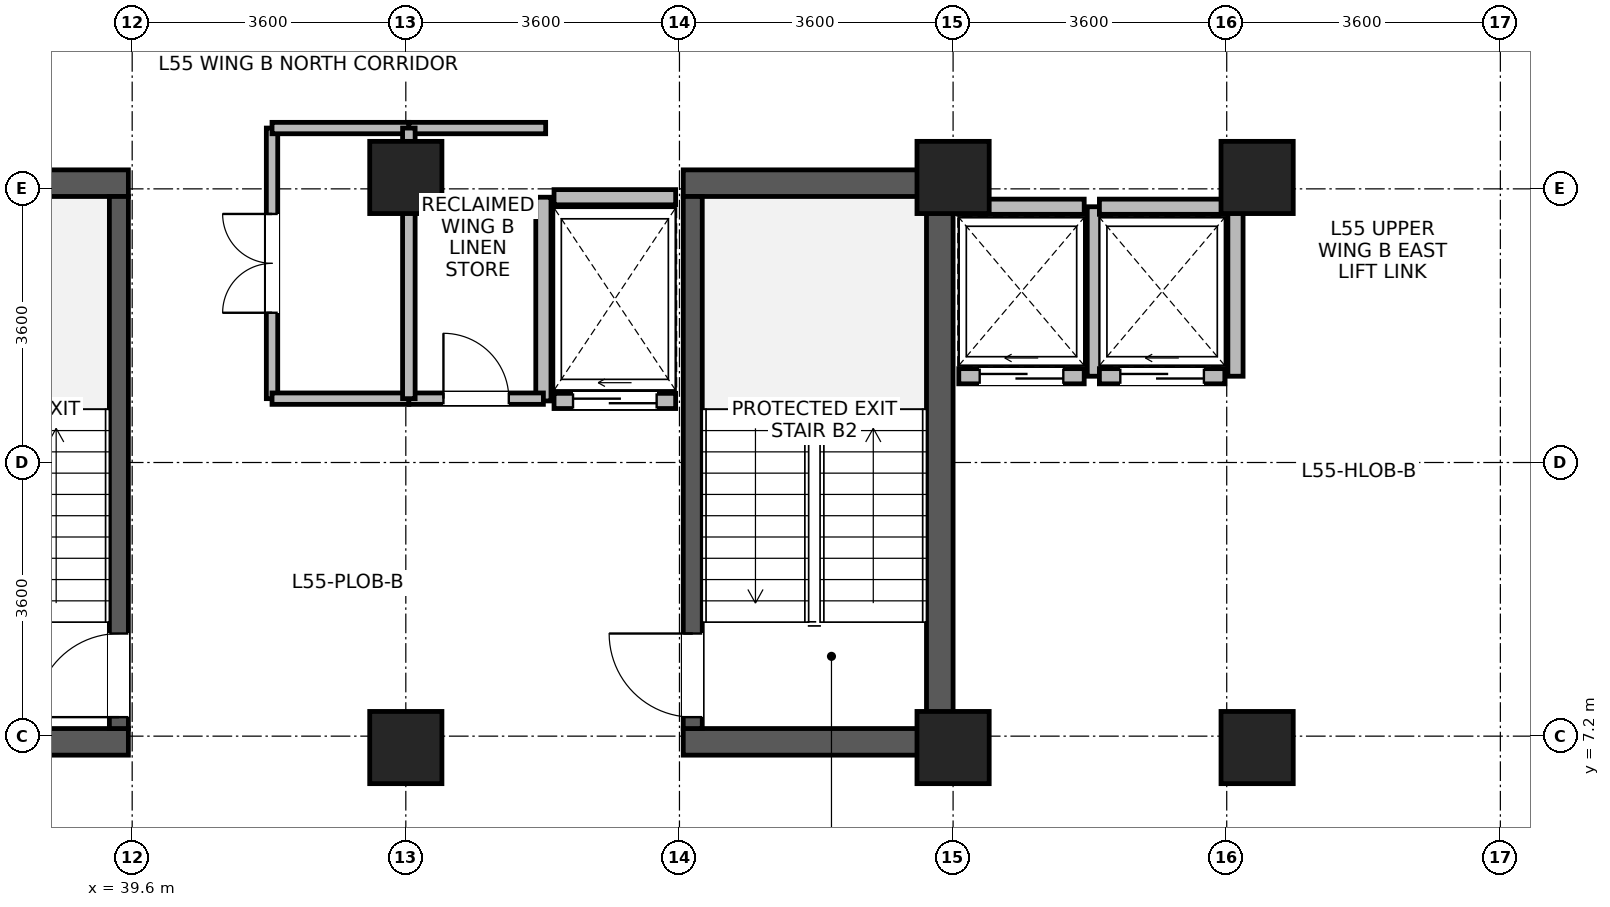
"""IFC4 building model, lengths in metres.
Left out: names, types, materials, properties, quantities, classifications, styles, units other than length and angle.
Written with IfcOpenShell. Run it as: python <this file> out.ifc"""

import sys

from ifc_helpers import new_model, si_unit, direction, frame, frame_2d, origin, origin_2d, place, context, subcontext, project, spatial, rectangle, extrude, source, transform, mapped, element, fill, save


model = new_model("IFC4")
c1 = context("Model", 3, precision=1e-05, world=origin(), true_north=direction((0.0, 1.0)))
c2 = subcontext(c1, "Body", "Model", "MODEL_VIEW")
j1 = project(units=[si_unit("LENGTHUNIT", "METRE"), si_unit("PLANEANGLEUNIT", "RADIAN")], contexts=[c1])
p1 = place(None, origin())
s1 = spatial("IfcSite", under=j1, at=p1, CompositionType="ELEMENT")
p2 = place(p1, origin())
s2 = spatial("IfcBuilding", under=s1, at=p2, CompositionType="ELEMENT")
p3 = place(p2, frame((0.0, 0.0, 216.6)))
s3 = spatial("IfcBuildingStorey", under=s2, at=p3, CompositionType="ELEMENT", Elevation=216.6)
p4 = place(p3, frame((50.225, 6.95, 0.0), z_axis=(0.0, 0.0, 1.0), x_axis=(0.0, 1.0, 0.0)))
e1 = element("IfcWall", 1, at=p4, inside=s3, PredefinedType="SHEAR", context=c2, shape_type="SweptSolid", body=[
    extrude(rectangle(XDim=7.7, YDim=0.35, at=frame_2d((3.85, 0.0))), origin(), (0.0, 0.0, 1.0), 3.47),
])
for number, where, z_axis, x_axis in (
    (2, (36.35, 7.125, 0.0), (0.0, 0.0, 1.0), (1.0, 0.0, 0.0)),
    (3, (46.85, 7.125, 0.0), (0.0, 0.0, 1.0), (1.0, 0.0, 0.0)),
    (4, (36.35, 14.475, 0.0), (0.0, 0.0, 1.0), (1.0, 0.0, 0.0)),
    (5, (46.85, 14.475, 0.0), (0.0, 0.0, 1.0), (1.0, 0.0, 0.0)),
):
    element("IfcWall", number, at=place(p3, frame(where, z_axis=z_axis, x_axis=x_axis)), inside=s3, PredefinedType="SHEAR", context=c2, shape_type="SweptSolid", body=[
        extrude(rectangle(XDim=3.2, YDim=0.35, at=frame_2d((1.6, 0.0))), origin(), (0.0, 0.0, 1.0), 3.47),
    ])
p5 = place(p3, frame((39.425, 7.3, 0.0), z_axis=(0.0, 0.0, 1.0), x_axis=(0.0, 1.0, 0.0)))
e6 = element("IfcWall", 6, at=p5, inside=s3, PredefinedType="SHEAR", context=c2, shape_type="SweptSolid", body=[
    extrude(rectangle(XDim=7.0, YDim=0.25, at=frame_2d((3.5, 0.0))), origin(), (0.0, 0.0, 1.0), 3.47),
])
p6 = place(p5, frame((0.15, 0.0, 0.0)))
e7 = element("IfcOpeningElement", 7, at=p6, cuts=e6, PredefinedType="OPENING", context=c2, shape_type="SweptSolid", body=[
    extrude(rectangle(XDim=1.1, YDim=2.08, at=frame_2d((0.55, 1.04))), frame((0.0, 0.135, 0.0), z_axis=(0.0, -1.0, 0.0), x_axis=(1.0, 0.0, 0.0)), (0.0, 0.0, 1.0), 0.27),
])
p7 = place(p3, frame((46.975, 7.3, 0.0), z_axis=(0.0, 0.0, 1.0), x_axis=(0.0, 1.0, 0.0)))
e8 = element("IfcWall", 8, at=p7, inside=s3, PredefinedType="SHEAR", context=c2, shape_type="SweptSolid", body=[
    extrude(rectangle(XDim=7.0, YDim=0.25, at=frame_2d((3.5, 0.0))), origin(), (0.0, 0.0, 1.0), 3.47),
])
p8 = place(p7, frame((0.15, 0.0, 0.0)))
e9 = element("IfcOpeningElement", 9, at=p8, cuts=e8, PredefinedType="OPENING", context=c2, shape_type="SweptSolid", body=[
    extrude(rectangle(XDim=1.1, YDim=2.08, at=frame_2d((0.55, 1.04))), frame((0.0, 0.135, 0.0), z_axis=(0.0, -1.0, 0.0), x_axis=(1.0, 0.0, 0.0)), (0.0, 0.0, 1.0), 0.27),
])
m1 = source(origin(), c2, "Body", "SweptSolid", [
    extrude(rectangle(XDim=0.95, YDim=0.95, at=origin_2d()), origin(), (0.0, 0.0, 1.0), 3.7),
])
for number, where, z_axis, x_axis in (
    (10, (43.2, 7.05, 0.0), (0.0, 0.0, 1.0), (1.0, 0.0, 0.0)),
    (11, (43.2, 14.55, 0.0), (0.0, 0.0, 1.0), (1.0, 0.0, 0.0)),
    (12, (50.4, 7.05, 0.0), (0.0, 0.0, 1.0), (1.0, 0.0, 0.0)),
    (13, (50.4, 14.55, 0.0), (0.0, 0.0, 1.0), (1.0, 0.0, 0.0)),
    (14, (54.4, 7.05, 0.0), (0.0, 0.0, 1.0), (1.0, 0.0, 0.0)),
    (15, (54.4, 14.55, 0.0), (0.0, 0.0, 1.0), (1.0, 0.0, 0.0)),
):
    element("IfcColumn", number, at=place(p3, frame(where, z_axis=z_axis, x_axis=x_axis)), inside=s3, PredefinedType="COLUMN", context=c2, shape_type="MappedRepresentation", body=[
        mapped(m1, transform((0.0, 0.0, 0.0), x_axis=(1.0, 0.0, 0.0), y_axis=(0.0, 1.0, 0.0), z_axis=(0.0, 0.0, 1.0), scale=1.0)),
    ])
p9 = place(p3, frame((50.475, 11.935, 0.0), z_axis=(0.0, 0.0, 1.0), x_axis=(1.0, 0.0, 0.0)))
e16 = element("IfcWall", 16, at=p9, inside=s3, PredefinedType="PARTITIONING", context=c2, shape_type="SweptSolid", body=[
    extrude(rectangle(XDim=1.65, YDim=0.2, at=frame_2d((0.825, 0.0))), origin(), (0.0, 0.0, 1.0), 3.45),
])
p10 = place(p9, frame((0.275, 0.0, 0.0)))
e17 = element("IfcOpeningElement", 17, at=p10, cuts=e16, PredefinedType="OPENING", context=c2, shape_type="SweptSolid", body=[
    extrude(rectangle(XDim=1.1, YDim=2.12, at=frame_2d((0.55, 1.06))), frame((0.0, 0.11, 0.0), z_axis=(0.0, -1.0, 0.0), x_axis=(1.0, 0.0, 0.0)), (0.0, 0.0, 1.0), 0.22),
])
p11 = place(p3, frame((50.475, 14.165, 0.0), z_axis=(0.0, 0.0, 1.0), x_axis=(1.0, 0.0, 0.0)))
e18 = element("IfcWall", 18, at=p11, inside=s3, PredefinedType="PARTITIONING", context=c2, shape_type="SweptSolid", body=[
    extrude(rectangle(XDim=1.65, YDim=0.2, at=frame_2d((0.825, 0.0))), origin(), (0.0, 0.0, 1.0), 3.45),
])
p12 = place(p3, frame((52.265, 11.935, 0.0), z_axis=(0.0, 0.0, 1.0), x_axis=(0.0, 1.0, 0.0)))
e19 = element("IfcWall", 19, at=p12, inside=s3, PredefinedType="PARTITIONING", context=c2, shape_type="SweptSolid", body=[
    extrude(rectangle(XDim=2.23, YDim=0.2, at=frame_2d((1.115, 0.0))), origin(), (0.0, 0.0, 1.0), 3.45),
])
p13 = place(p3, frame((52.325, 11.935, 0.0), z_axis=(0.0, 0.0, 1.0), x_axis=(1.0, 0.0, 0.0)))
e20 = element("IfcWall", 20, at=p13, inside=s3, PredefinedType="PARTITIONING", context=c2, shape_type="SweptSolid", body=[
    extrude(rectangle(XDim=1.65, YDim=0.2, at=frame_2d((0.825, 0.0))), origin(), (0.0, 0.0, 1.0), 3.45),
])
p14 = place(p13, frame((0.275, 0.0, 0.0)))
e21 = element("IfcOpeningElement", 21, at=p14, cuts=e20, PredefinedType="OPENING", context=c2, shape_type="SweptSolid", body=[
    extrude(rectangle(XDim=1.1, YDim=2.12, at=frame_2d((0.55, 1.06))), frame((0.0, 0.11, 0.0), z_axis=(0.0, -1.0, 0.0), x_axis=(1.0, 0.0, 0.0)), (0.0, 0.0, 1.0), 0.22),
])
p15 = place(p3, frame((52.325, 14.165, 0.0), z_axis=(0.0, 0.0, 1.0), x_axis=(1.0, 0.0, 0.0)))
e22 = element("IfcWall", 22, at=p15, inside=s3, PredefinedType="PARTITIONING", context=c2, shape_type="SweptSolid", body=[
    extrude(rectangle(XDim=1.65, YDim=0.2, at=frame_2d((0.825, 0.0))), origin(), (0.0, 0.0, 1.0), 3.45),
])
p16 = place(p3, frame((54.115, 11.935, 0.0), z_axis=(0.0, 0.0, 1.0), x_axis=(0.0, 1.0, 0.0)))
e23 = element("IfcWall", 23, at=p16, inside=s3, PredefinedType="PARTITIONING", context=c2, shape_type="SweptSolid", body=[
    extrude(rectangle(XDim=2.23, YDim=0.2, at=frame_2d((1.115, 0.0))), origin(), (0.0, 0.0, 1.0), 3.45),
])
p17 = place(p3, frame((45.15, 11.61, 0.0), z_axis=(0.0, 0.0, 1.0), x_axis=(1.0, 0.0, 0.0)))
e24 = element("IfcWall", 24, at=p17, inside=s3, PredefinedType="PARTITIONING", context=c2, shape_type="SweptSolid", body=[
    extrude(rectangle(XDim=1.6, YDim=0.2, at=frame_2d((0.8, 0.0))), origin(), (0.0, 0.0, 1.0), 3.45),
])
p18 = place(p17, frame((0.25, 0.0, 0.0)))
e25 = element("IfcOpeningElement", 25, at=p18, cuts=e24, PredefinedType="OPENING", context=c2, shape_type="SweptSolid", body=[
    extrude(rectangle(XDim=1.1, YDim=2.12, at=frame_2d((0.55, 1.06))), frame((0.0, 0.11, 0.0), z_axis=(0.0, -1.0, 0.0), x_axis=(1.0, 0.0, 0.0)), (0.0, 0.0, 1.0), 0.22),
])
p19 = place(p3, frame((45.15, 14.29, 0.0), z_axis=(0.0, 0.0, 1.0), x_axis=(1.0, 0.0, 0.0)))
e26 = element("IfcWall", 26, at=p19, inside=s3, PredefinedType="PARTITIONING", context=c2, shape_type="SweptSolid", body=[
    extrude(rectangle(XDim=1.6, YDim=0.2, at=frame_2d((0.8, 0.0))), origin(), (0.0, 0.0, 1.0), 2.55),
])
p20 = place(p3, frame((45.01, 11.61, 0.0), z_axis=(0.0, 0.0, 1.0), x_axis=(0.0, 1.0, 0.0)))
e27 = element("IfcWall", 27, at=p20, inside=s3, PredefinedType="PARTITIONING", context=c2, shape_type="SweptSolid", body=[
    extrude(rectangle(XDim=2.68, YDim=0.2, at=frame_2d((1.34, 0.0))), origin(), (0.0, 0.0, 1.0), 3.45),
])
p21 = place(p3, frame((41.44, 11.64, 0.0), z_axis=(0.0, 0.0, 1.0), x_axis=(0.0, 1.0, 0.0)))
e28 = element("IfcWall", 28, at=p21, inside=s3, PredefinedType="PARTITIONING", context=c2, shape_type="SweptSolid", body=[
    extrude(rectangle(XDim=3.56, YDim=0.15, at=frame_2d((1.78, 0.0))), origin(), (0.0, 0.0, 1.0), 3.45),
])
p22 = place(p21, frame((1.13, 0.0, 0.0)))
e29 = element("IfcOpeningElement", 29, at=p22, cuts=e28, PredefinedType="OPENING", context=c2, shape_type="SweptSolid", body=[
    extrude(rectangle(XDim=1.3, YDim=2.12, at=frame_2d((0.65, 1.06))), frame((0.0, 0.085, 0.0), z_axis=(0.0, -1.0, 0.0), x_axis=(1.0, 0.0, 0.0)), (0.0, 0.0, 1.0), 0.17),
])
for number, where, z_axis, x_axis in (
    (30, (41.44, 11.64, 0.0), (0.0, 0.0, 1.0), (1.0, 0.0, 0.0)),
    (31, (41.44, 15.2, 0.0), (0.0, 0.0, 1.0), (1.0, 0.0, 0.0)),
):
    element("IfcWall", number, at=place(p3, frame(where, z_axis=z_axis, x_axis=x_axis)), inside=s3, PredefinedType="PARTITIONING", context=c2, shape_type="SweptSolid", body=[
        extrude(rectangle(XDim=1.8, YDim=0.15, at=frame_2d((0.9, 0.0))), origin(), (0.0, 0.0, 1.0), 3.45),
    ])
p23 = place(p3, frame((43.24, 11.64, 0.0), z_axis=(0.0, 0.0, 1.0), x_axis=(1.0, 0.0, 0.0)))
e32 = element("IfcWall", 32, at=p23, inside=s3, PredefinedType="PARTITIONING", context=c2, shape_type="SweptSolid", body=[
    extrude(rectangle(XDim=1.77, YDim=0.15, at=frame_2d((0.885, 0.0))), origin(), (0.0, 0.0, 1.0), 3.45),
])
p24 = place(p23, frame((0.455, 0.0, 0.0)))
e33 = element("IfcOpeningElement", 33, at=p24, cuts=e32, PredefinedType="OPENING", context=c2, shape_type="SweptSolid", body=[
    extrude(rectangle(XDim=0.86, YDim=2.02, at=frame_2d((0.43, 1.01))), frame((0.0, 0.085, 0.0), z_axis=(0.0, -1.0, 0.0), x_axis=(1.0, 0.0, 0.0)), (0.0, 0.0, 1.0), 0.17),
])
p25 = place(p3, frame((43.24, 15.2, 0.0), z_axis=(0.0, 0.0, 1.0), x_axis=(1.0, 0.0, 0.0)))
e34 = element("IfcWall", 34, at=p25, inside=s3, PredefinedType="PARTITIONING", context=c2, shape_type="SweptSolid", body=[
    extrude(rectangle(XDim=1.8, YDim=0.15, at=frame_2d((0.9, 0.0))), origin(), (0.0, 0.0, 1.0), 3.45),
])
p26 = place(p3, frame((43.24, 11.64, 0.0), z_axis=(0.0, 0.0, 1.0), x_axis=(0.0, 1.0, 0.0)))
e35 = element("IfcWall", 35, at=p26, inside=s3, PredefinedType="PARTITIONING", context=c2, shape_type="SweptSolid", body=[
    extrude(rectangle(XDim=3.56, YDim=0.165, at=frame_2d((1.78, 0.0))), origin(), (0.0, 0.0, 1.0), 3.45),
])
p27 = place(p6, origin())
e36 = element("IfcDoor", 36, at=p27, inside=s3, OperationType="SINGLE_SWING_LEFT", PredefinedType="DOOR", context=c2, shape_type="SweptSolid", body=[
    extrude(rectangle(XDim=1.1, YDim=2.08, at=frame_2d((0.55, 1.04))), frame((0.0, 0.025, 0.0), z_axis=(0.0, -1.0, 0.0), x_axis=(1.0, 0.0, 0.0)), (0.0, 0.0, 1.0), 0.05),
])
fill(e7, e36)
p28 = place(p8, origin())
e37 = element("IfcDoor", 37, at=p28, inside=s3, OperationType="SINGLE_SWING_RIGHT", PredefinedType="DOOR", context=c2, shape_type="SweptSolid", body=[
    extrude(rectangle(XDim=1.1, YDim=2.08, at=frame_2d((0.55, 1.04))), frame((0.0, 0.025, 0.0), z_axis=(0.0, -1.0, 0.0), x_axis=(1.0, 0.0, 0.0)), (0.0, 0.0, 1.0), 0.05),
])
fill(e9, e37)
p29 = place(p10, origin())
e38 = element("IfcDoor", 38, at=p29, inside=s3, OperationType="SLIDING_TO_LEFT", PredefinedType="DOOR", context=c2, shape_type="SweptSolid", body=[
    extrude(rectangle(XDim=1.1, YDim=2.12, at=frame_2d((0.55, 1.06))), frame((0.0, 0.025, 0.0), z_axis=(0.0, -1.0, 0.0), x_axis=(1.0, 0.0, 0.0)), (0.0, 0.0, 1.0), 0.05),
])
fill(e17, e38)
p30 = place(p14, origin())
e39 = element("IfcDoor", 39, at=p30, inside=s3, OperationType="SLIDING_TO_LEFT", PredefinedType="DOOR", context=c2, shape_type="SweptSolid", body=[
    extrude(rectangle(XDim=1.1, YDim=2.12, at=frame_2d((0.55, 1.06))), frame((0.0, 0.025, 0.0), z_axis=(0.0, -1.0, 0.0), x_axis=(1.0, 0.0, 0.0)), (0.0, 0.0, 1.0), 0.05),
])
fill(e21, e39)
p31 = place(p18, origin())
e40 = element("IfcDoor", 40, at=p31, inside=s3, OperationType="SLIDING_TO_LEFT", PredefinedType="DOOR", context=c2, shape_type="SweptSolid", body=[
    extrude(rectangle(XDim=1.1, YDim=2.12, at=frame_2d((0.55, 1.06))), frame((0.0, 0.025, 0.0), z_axis=(0.0, -1.0, 0.0), x_axis=(1.0, 0.0, 0.0)), (0.0, 0.0, 1.0), 0.05),
])
fill(e25, e40)
p32 = place(p22, origin())
e41 = element("IfcDoor", 41, at=p32, inside=s3, OperationType="DOUBLE_DOOR_SINGLE_SWING", PredefinedType="DOOR", context=c2, shape_type="SweptSolid", body=[
    extrude(rectangle(XDim=1.3, YDim=2.12, at=frame_2d((0.65, 1.06))), frame((0.0, 0.025, 0.0), z_axis=(0.0, -1.0, 0.0), x_axis=(1.0, 0.0, 0.0)), (0.0, 0.0, 1.0), 0.05),
])
fill(e29, e41)
p33 = place(p24, origin())
e42 = element("IfcDoor", 42, at=p33, inside=s3, OperationType="SINGLE_SWING_LEFT", PredefinedType="DOOR", context=c2, shape_type="SweptSolid", body=[
    extrude(rectangle(XDim=0.86, YDim=2.02, at=frame_2d((0.43, 1.01))), frame((0.0, 0.025, 0.0), z_axis=(0.0, -1.0, 0.0), x_axis=(1.0, 0.0, 0.0)), (0.0, 0.0, 1.0), 0.05),
])
fill(e33, e42)
save(model, sys.argv[1])
